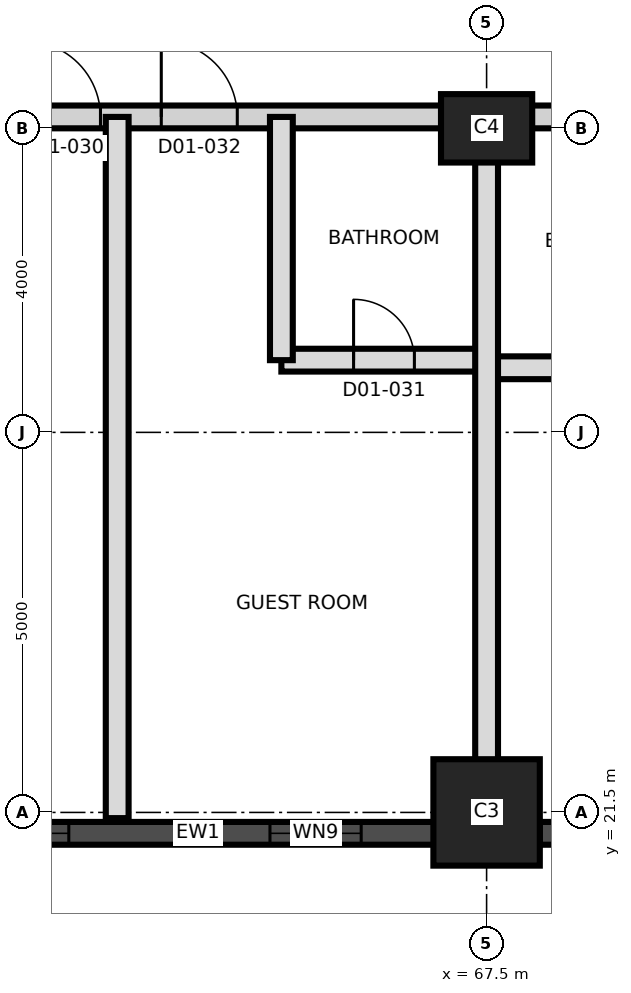
"""IFC4 building model, lengths in metres.
Left out: names, types, materials, properties, quantities, classifications, styles, units other than length and angle.
Written with IfcOpenShell. Run it as: python <this file> out.ifc"""

import sys

from ifc_helpers import new_model, si_unit, direction, frame, frame_2d, origin, origin_2d, place, context, subcontext, project, spatial, rectangle, extrude, element, fill, save


model = new_model("IFC4")
c1 = context("Model", 3, precision=1e-05, world=origin(), true_north=direction((0.0, 1.0)))
c2 = subcontext(c1, "Body", "Model", "MODEL_VIEW")
j1 = project(units=[si_unit("LENGTHUNIT", "METRE"), si_unit("PLANEANGLEUNIT", "RADIAN")], contexts=[c1])
p1 = place(None, origin())
s1 = spatial("IfcSite", under=j1, at=p1, CompositionType="ELEMENT")
p2 = place(p1, origin())
s2 = spatial("IfcBuilding", under=s1, at=p2, CompositionType="ELEMENT")
p3 = place(p2, frame((0.0, 0.0, 37.2)))
s3 = spatial("IfcBuildingStorey", under=s2, at=p3, CompositionType="ELEMENT", Elevation=37.2)
p4 = place(p3, frame((67.5, 21.5, 0.0), z_axis=(0.0, 0.0, 1.0), x_axis=(1.0, 0.0, 0.0)))
e1 = element("IfcColumn", 1, at=p4, inside=s3, PredefinedType="COLUMN", context=c2, shape_type="SweptSolid", body=[
    extrude(rectangle(XDim=1.4, YDim=1.4, at=origin_2d()), origin(), (0.0, 0.0, 1.0), 3.7),
])
p5 = place(p3, frame((67.5, 30.5, 0.0), z_axis=(0.0, 0.0, 1.0), x_axis=(1.0, 0.0, 0.0)))
e2 = element("IfcColumn", 2, at=p5, inside=s3, PredefinedType="COLUMN", context=c2, shape_type="SweptSolid", body=[
    extrude(rectangle(XDim=1.2, YDim=0.9, at=origin_2d()), origin(), (0.0, 0.0, 1.0), 3.7),
])
p6 = place(p3, frame((59.207, 21.225, 0.0), z_axis=(0.0, 0.0, 1.0), x_axis=(1.0, 0.0, 0.0)))
e3 = element("IfcWall", 3, at=p6, inside=s3, PredefinedType="SOLIDWALL", context=c2, shape_type="SweptSolid", body=[
    extrude(rectangle(XDim=8.993, YDim=0.3, at=frame_2d((4.497, 0.0))), origin(), (0.0, 0.0, 1.0), 3.4),
])
p7 = place(p6, frame((0.997, 0.0, 0.3)))
e4 = element("IfcOpeningElement", 4, at=p7, cuts=e3, PredefinedType="OPENING", context=c2, shape_type="SweptSolid", body=[
    extrude(rectangle(XDim=1.8, YDim=2.4, at=frame_2d((0.9, 1.2))), frame((0.0, 0.16, 0.0), z_axis=(0.0, -1.0, 0.0), x_axis=(1.0, 0.0, 0.0)), (0.0, 0.0, 1.0), 0.32),
])
p8 = place(p6, frame((5.443, 0.0, 0.9)))
e5 = element("IfcOpeningElement", 5, at=p8, cuts=e3, PredefinedType="OPENING", context=c2, shape_type="SweptSolid", body=[
    extrude(rectangle(XDim=1.2, YDim=1.5, at=frame_2d((0.6, 0.75))), frame((0.0, 0.16, 0.0), z_axis=(0.0, -1.0, 0.0), x_axis=(1.0, 0.0, 0.0)), (0.0, 0.0, 1.0), 0.32),
])
p9 = place(p3, frame((68.2, 21.225, 0.0), z_axis=(0.0, 0.0, 1.0), x_axis=(1.0, 0.0, 0.0)))
e6 = element("IfcWall", 6, at=p9, inside=s3, PredefinedType="SOLIDWALL", context=c2, shape_type="SweptSolid", body=[
    extrude(rectangle(XDim=7.6, YDim=0.3, at=frame_2d((3.8, 0.0))), origin(), (0.0, 0.0, 1.0), 2.7),
])
p10 = place(p9, frame((0.95, 0.0, 0.9)))
e7 = element("IfcOpeningElement", 7, at=p10, cuts=e6, PredefinedType="OPENING", context=c2, shape_type="SweptSolid", body=[
    extrude(rectangle(XDim=1.2, YDim=1.5, at=frame_2d((0.6, 0.75))), frame((0.0, 0.16, 0.0), z_axis=(0.0, -1.0, 0.0), x_axis=(1.0, 0.0, 0.0)), (0.0, 0.0, 1.0), 0.32),
])
p11 = place(p9, frame((5.45, 0.0, 0.9)))
e8 = element("IfcOpeningElement", 8, at=p11, cuts=e6, PredefinedType="OPENING", context=c2, shape_type="SweptSolid", body=[
    extrude(rectangle(XDim=1.2, YDim=1.5, at=frame_2d((0.6, 0.75))), frame((0.0, 0.16, 0.0), z_axis=(0.0, -1.0, 0.0), x_axis=(1.0, 0.0, 0.0)), (0.0, 0.0, 1.0), 0.32),
])
p12 = place(p3, frame((67.5, 27.35, 0.0), z_axis=(0.0, 0.0, 1.0), x_axis=(1.0, 0.0, 0.0)))
e9 = element("IfcWall", 9, at=p12, inside=s3, PredefinedType="PARTITIONING", context=c2, shape_type="SweptSolid", body=[
    extrude(rectangle(XDim=3.0, YDim=0.3, at=frame_2d((1.5, 0.0))), origin(), (0.0, 0.0, 1.0), 3.4),
])
p13 = place(p12, frame((1.1, 0.0, 0.0)))
e10 = element("IfcOpeningElement", 10, at=p13, cuts=e9, PredefinedType="OPENING", context=c2, shape_type="SweptSolid", body=[
    extrude(rectangle(XDim=0.8, YDim=2.1, at=frame_2d((0.4, 1.05))), frame((0.0, 0.16, 0.0), z_axis=(0.0, -1.0, 0.0), x_axis=(1.0, 0.0, 0.0)), (0.0, 0.0, 1.0), 0.32),
])
p14 = place(p3, frame((64.8, 27.45, 0.0), z_axis=(0.0, 0.0, 1.0), x_axis=(1.0, 0.0, 0.0)))
e11 = element("IfcWall", 11, at=p14, inside=s3, PredefinedType="PARTITIONING", context=c2, shape_type="SweptSolid", body=[
    extrude(rectangle(XDim=2.7, YDim=0.3, at=frame_2d((1.35, 0.0))), origin(), (0.0, 0.0, 1.0), 3.4),
])
p15 = place(p14, frame((0.95, 0.0, 0.0)))
e12 = element("IfcOpeningElement", 12, at=p15, cuts=e11, PredefinedType="OPENING", context=c2, shape_type="SweptSolid", body=[
    extrude(rectangle(XDim=0.8, YDim=2.1, at=frame_2d((0.4, 1.05))), frame((0.0, 0.16, 0.0), z_axis=(0.0, -1.0, 0.0), x_axis=(1.0, 0.0, 0.0)), (0.0, 0.0, 1.0), 0.32),
])
p16 = place(p3, frame((58.95, 30.65, 0.0), z_axis=(0.0, 0.0, 1.0), x_axis=(1.0, 0.0, 0.0)))
e13 = element("IfcWall", 13, at=p16, inside=s3, PredefinedType="PARTITIONING", context=c2, shape_type="SweptSolid", body=[
    extrude(rectangle(XDim=26.38, YDim=0.3, at=frame_2d((13.19, 0.0))), origin(), (0.0, 0.0, 1.0), 3.4),
])
p17 = place(p16, frame((2.47, 0.0, 0.0)))
e14 = element("IfcOpeningElement", 14, at=p17, cuts=e13, PredefinedType="OPENING", context=c2, shape_type="SweptSolid", body=[
    extrude(rectangle(XDim=1.0, YDim=2.1, at=frame_2d((0.5, 1.05))), frame((0.0, 0.16, 0.0), z_axis=(0.0, -1.0, 0.0), x_axis=(1.0, 0.0, 0.0)), (0.0, 0.0, 1.0), 0.32),
])
p18 = place(p16, frame((4.27, 0.0, 0.0)))
e15 = element("IfcOpeningElement", 15, at=p18, cuts=e13, PredefinedType="OPENING", context=c2, shape_type="SweptSolid", body=[
    extrude(rectangle(XDim=1.0, YDim=2.1, at=frame_2d((0.5, 1.05))), frame((0.0, 0.16, 0.0), z_axis=(0.0, -1.0, 0.0), x_axis=(1.0, 0.0, 0.0)), (0.0, 0.0, 1.0), 0.32),
])
p19 = place(p16, frame((11.8, 0.0, 0.0)))
e16 = element("IfcOpeningElement", 16, at=p19, cuts=e13, PredefinedType="OPENING", context=c2, shape_type="SweptSolid", body=[
    extrude(rectangle(XDim=1.0, YDim=2.4, at=frame_2d((0.5, 1.2))), frame((0.0, 0.16, 0.0), z_axis=(0.0, -1.0, 0.0), x_axis=(1.0, 0.0, 0.0)), (0.0, 0.0, 1.0), 0.32),
])
p20 = place(p16, frame((13.3, 0.0, 0.0)))
e17 = element("IfcOpeningElement", 17, at=p20, cuts=e13, PredefinedType="OPENING", context=c2, shape_type="SweptSolid", body=[
    extrude(rectangle(XDim=1.0, YDim=2.4, at=frame_2d((0.5, 1.2))), frame((0.0, 0.16, 0.0), z_axis=(0.0, -1.0, 0.0), x_axis=(1.0, 0.0, 0.0)), (0.0, 0.0, 1.0), 0.32),
])
p21 = place(p16, frame((18.685, 0.0, 0.0)))
e18 = element("IfcOpeningElement", 18, at=p21, cuts=e13, PredefinedType="OPENING", context=c2, shape_type="SweptSolid", body=[
    extrude(rectangle(XDim=1.2, YDim=2.1, at=frame_2d((0.6, 1.05))), frame((0.0, 0.16, 0.0), z_axis=(0.0, -1.0, 0.0), x_axis=(1.0, 0.0, 0.0)), (0.0, 0.0, 1.0), 0.32),
])
p22 = place(p16, frame((21.935, 0.0, 0.0)))
e19 = element("IfcOpeningElement", 19, at=p22, cuts=e13, PredefinedType="OPENING", context=c2, shape_type="SweptSolid", body=[
    extrude(rectangle(XDim=1.0, YDim=2.1, at=frame_2d((0.5, 1.05))), frame((0.0, 0.16, 0.0), z_axis=(0.0, -1.0, 0.0), x_axis=(1.0, 0.0, 0.0)), (0.0, 0.0, 1.0), 0.32),
])
p23 = place(p3, frame((62.64, 21.425, 0.0), z_axis=(0.0, 0.0, 1.0), x_axis=(0.0, 1.0, 0.0)))
e20 = element("IfcWall", 20, at=p23, inside=s3, PredefinedType="PARTITIONING", context=c2, shape_type="SweptSolid", body=[
    extrude(rectangle(XDim=9.225, YDim=0.3, at=frame_2d((4.612, 0.0))), origin(), (0.0, 0.0, 1.0), 3.4),
])
p24 = place(p3, frame((64.8, 27.45, 0.0), z_axis=(0.0, 0.0, 1.0), x_axis=(0.0, 1.0, 0.0)))
e21 = element("IfcWall", 21, at=p24, inside=s3, PredefinedType="PARTITIONING", context=c2, shape_type="SweptSolid", body=[
    extrude(rectangle(XDim=3.2, YDim=0.3, at=frame_2d((1.6, 0.0))), origin(), (0.0, 0.0, 1.0), 3.4),
])
p25 = place(p3, frame((67.5, 21.425, 0.0), z_axis=(0.0, 0.0, 1.0), x_axis=(0.0, 1.0, 0.0)))
e22 = element("IfcWall", 22, at=p25, inside=s3, PredefinedType="PARTITIONING", context=c2, shape_type="SweptSolid", body=[
    extrude(rectangle(XDim=9.225, YDim=0.3, at=frame_2d((4.612, 0.0))), origin(), (0.0, 0.0, 1.0), 3.4),
])
p26 = place(p7, origin())
e23 = element("IfcWindow", 23, at=p26, inside=s3, PartitioningType="SINGLE_PANEL", PredefinedType="WINDOW", context=c2, shape_type="SweptSolid", body=[
    extrude(rectangle(XDim=1.8, YDim=2.4, at=frame_2d((0.9, 1.2))), frame((0.0, 0.03, 0.0), z_axis=(0.0, -1.0, 0.0), x_axis=(1.0, 0.0, 0.0)), (0.0, 0.0, 1.0), 0.06),
])
fill(e4, e23)
p27 = place(p8, origin())
e24 = element("IfcWindow", 24, at=p27, inside=s3, PartitioningType="SINGLE_PANEL", PredefinedType="WINDOW", context=c2, shape_type="SweptSolid", body=[
    extrude(rectangle(XDim=1.2, YDim=1.5, at=frame_2d((0.6, 0.75))), frame((0.0, 0.03, 0.0), z_axis=(0.0, -1.0, 0.0), x_axis=(1.0, 0.0, 0.0)), (0.0, 0.0, 1.0), 0.06),
])
fill(e5, e24)
p28 = place(p17, origin())
e25 = element("IfcDoor", 25, at=p28, inside=s3, OperationType="SINGLE_SWING_RIGHT", PredefinedType="DOOR", context=c2, shape_type="SweptSolid", body=[
    extrude(rectangle(XDim=1.0, YDim=2.1, at=frame_2d((0.5, 1.05))), frame((0.0, 0.025, 0.0), z_axis=(0.0, -1.0, 0.0), x_axis=(1.0, 0.0, 0.0)), (0.0, 0.0, 1.0), 0.05),
])
fill(e14, e25)
p29 = place(p15, origin())
e26 = element("IfcDoor", 26, at=p29, inside=s3, OperationType="SINGLE_SWING_RIGHT", PredefinedType="DOOR", context=c2, shape_type="SweptSolid", body=[
    extrude(rectangle(XDim=0.8, YDim=2.1, at=frame_2d((0.4, 1.05))), frame((0.0, 0.025, 0.0), z_axis=(0.0, -1.0, 0.0), x_axis=(1.0, 0.0, 0.0)), (0.0, 0.0, 1.0), 0.05),
])
fill(e12, e26)
p30 = place(p18, origin())
e27 = element("IfcDoor", 27, at=p30, inside=s3, OperationType="SINGLE_SWING_LEFT", PredefinedType="DOOR", context=c2, shape_type="SweptSolid", body=[
    extrude(rectangle(XDim=1.0, YDim=2.1, at=frame_2d((0.5, 1.05))), frame((0.0, 0.025, 0.0), z_axis=(0.0, -1.0, 0.0), x_axis=(1.0, 0.0, 0.0)), (0.0, 0.0, 1.0), 0.05),
])
fill(e15, e27)
save(model, sys.argv[1])
